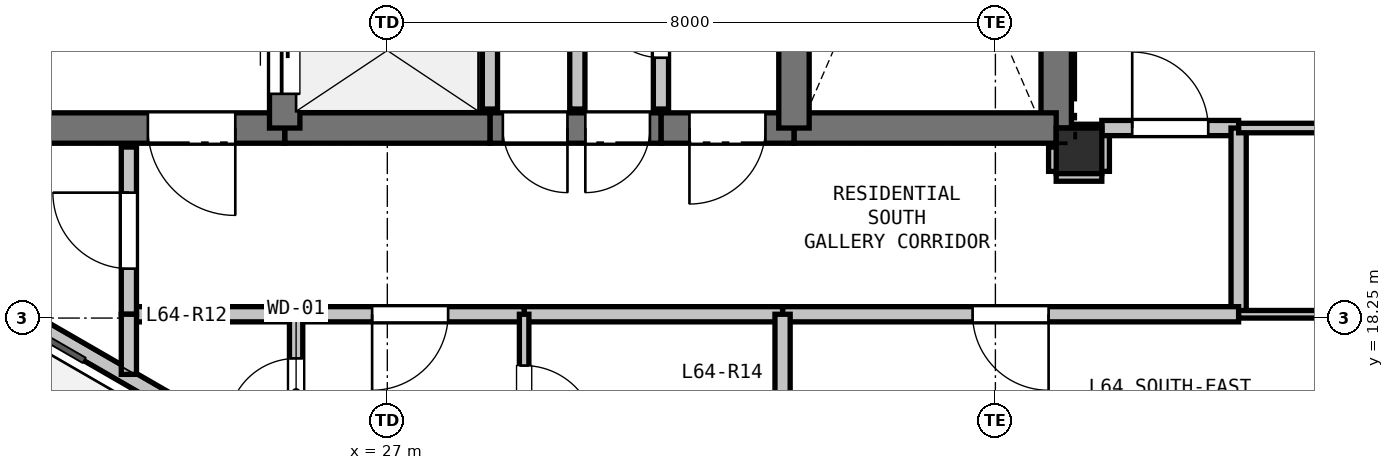
"""IFC4 building model, lengths in metres.
Left out: names, types, materials, properties, quantities, classifications, styles, units other than length and angle.
Written with IfcOpenShell. Run it as: python <this file> out.ifc"""

import sys

from ifc_helpers import new_model, si_unit, direction, frame, frame_2d, origin, origin_2d, place, context, subcontext, project, spatial, rectangle, extrude, element, fill, save


model = new_model("IFC4")
c1 = context("Model", 3, precision=1e-05, world=origin(), true_north=direction((0.0, 1.0)))
c2 = subcontext(c1, "Body", "Model", "MODEL_VIEW")
j1 = project(units=[si_unit("LENGTHUNIT", "METRE"), si_unit("PLANEANGLEUNIT", "RADIAN")], contexts=[c1])
p1 = place(None, origin())
s1 = spatial("IfcSite", under=j1, at=p1, CompositionType="ELEMENT")
p2 = place(p1, origin())
s2 = spatial("IfcBuilding", under=s1, at=p2, CompositionType="ELEMENT")
p3 = place(p2, frame((0.0, 0.0, 229.8)))
s3 = spatial("IfcBuildingStorey", under=s2, at=p3, CompositionType="ELEMENT", Elevation=229.8)
p4 = place(p3, frame((36.1, 20.45, 0.0), z_axis=(0.0, 0.0, 1.0), x_axis=(1.0, 0.0, 0.0)))
e1 = element("IfcColumn", 1, at=p4, inside=s3, PredefinedType="COLUMN", context=c2, shape_type="SweptSolid", body=[
    extrude(rectangle(XDim=0.6, YDim=0.6, at=origin_2d()), origin(), (0.0, 0.0, 1.0), 3.3),
])
p5 = place(p3, frame((27.191, 15.389, 0.0), z_axis=(0.0, 0.0, 1.0), x_axis=(-0.866019557082, 0.500010126649, 0.0)))
e2 = element("IfcWall", 2, at=p5, inside=s3, PredefinedType="PARAPET", context=c2, shape_type="SweptSolid", body=[
    extrude(rectangle(XDim=8.228, YDim=0.2, at=frame_2d((4.114, 0.0))), origin(), (0.0, 0.0, 1.0), 0.2),
])
p6 = place(p3, frame((35.8, 28.1, 0.0), z_axis=(0.0, 0.0, 1.0), x_axis=(0.0, -1.0, 0.0)))
e3 = element("IfcWall", 3, at=p6, inside=s3, PredefinedType="SHEAR", context=c2, shape_type="SweptSolid", body=[
    extrude(rectangle(XDim=7.35, YDim=0.4, at=frame_2d((3.675, 0.0))), origin(), (0.0, 0.0, 1.0), 3.08),
])
p7 = place(p3, frame((35.8, 20.75, 0.0), z_axis=(0.0, 0.0, 1.0), x_axis=(-1.0, 0.0, 0.0)))
e4 = element("IfcWall", 4, at=p7, inside=s3, PredefinedType="SHEAR", context=c2, shape_type="SweptSolid", body=[
    extrude(rectangle(XDim=3.45, YDim=0.4, at=frame_2d((1.725, 0.0))), origin(), (0.0, 0.0, 1.0), 3.08),
])
p8 = place(p3, frame((32.35, 20.75, 0.0), z_axis=(0.0, 0.0, 1.0), x_axis=(-1.0, 0.0, 0.0)))
e5 = element("IfcWall", 5, at=p8, inside=s3, PredefinedType="SHEAR", context=c2, shape_type="SweptSolid", body=[
    extrude(rectangle(XDim=1.75, YDim=0.4, at=frame_2d((0.875, 0.0))), origin(), (0.0, 0.0, 1.0), 3.08),
])
p9 = place(p8, frame((0.375, 0.0, 0.0)))
e6 = element("IfcOpeningElement", 6, at=p9, cuts=e5, PredefinedType="OPENING", context=c2, shape_type="SweptSolid", body=[
    extrude(rectangle(XDim=1.0, YDim=2.15, at=frame_2d((0.5, 1.075))), frame((0.0, 0.21, 0.0), z_axis=(0.0, -1.0, 0.0), x_axis=(1.0, 0.0, 0.0)), (0.0, 0.0, 1.0), 0.42),
])
p10 = place(p3, frame((30.6, 20.75, 0.0), z_axis=(0.0, 0.0, 1.0), x_axis=(-1.0, 0.0, 0.0)))
e7 = element("IfcWall", 7, at=p10, inside=s3, PredefinedType="SHEAR", context=c2, shape_type="SweptSolid", body=[
    extrude(rectangle(XDim=2.25, YDim=0.4, at=frame_2d((1.125, 0.0))), origin(), (0.0, 0.0, 1.0), 3.08),
])
p11 = place(p10, frame((1.23, 0.0, 0.0)))
e8 = element("IfcOpeningElement", 8, at=p11, cuts=e7, PredefinedType="OPENING", context=c2, shape_type="SweptSolid", body=[
    extrude(rectangle(XDim=0.85, YDim=2.1, at=frame_2d((0.425, 1.05))), frame((0.0, 0.21, 0.0), z_axis=(0.0, -1.0, 0.0), x_axis=(1.0, 0.0, 0.0)), (0.0, 0.0, 1.0), 0.42),
])
p12 = place(p10, frame((0.145, 0.0, 0.0)))
e9 = element("IfcOpeningElement", 9, at=p12, cuts=e7, PredefinedType="OPENING", context=c2, shape_type="SweptSolid", body=[
    extrude(rectangle(XDim=0.85, YDim=2.1, at=frame_2d((0.425, 1.05))), frame((0.0, 0.21, 0.0), z_axis=(0.0, -1.0, 0.0), x_axis=(1.0, 0.0, 0.0)), (0.0, 0.0, 1.0), 0.42),
])
p13 = place(p3, frame((28.35, 20.75, 0.0), z_axis=(0.0, 0.0, 1.0), x_axis=(-1.0, 0.0, 0.0)))
e10 = element("IfcWall", 10, at=p13, inside=s3, PredefinedType="SHEAR", context=c2, shape_type="SweptSolid", body=[
    extrude(rectangle(XDim=2.7, YDim=0.4, at=frame_2d((1.35, 0.0))), origin(), (0.0, 0.0, 1.0), 3.08),
])
p14 = place(p3, frame((25.65, 20.75, 0.0), z_axis=(0.0, 0.0, 1.0), x_axis=(-1.0, 0.0, 0.0)))
e11 = element("IfcWall", 11, at=p14, inside=s3, PredefinedType="SHEAR", context=c2, shape_type="SweptSolid", body=[
    extrude(rectangle(XDim=3.45, YDim=0.4, at=frame_2d((1.725, 0.0))), origin(), (0.0, 0.0, 1.0), 3.08),
])
p15 = place(p14, frame((0.65, 0.0, 0.0)))
e12 = element("IfcOpeningElement", 12, at=p15, cuts=e11, PredefinedType="OPENING", context=c2, shape_type="SweptSolid", body=[
    extrude(rectangle(XDim=1.15, YDim=2.15, at=frame_2d((0.575, 1.075))), frame((0.0, 0.21, 0.0), z_axis=(0.0, -1.0, 0.0), x_axis=(1.0, 0.0, 0.0)), (0.0, 0.0, 1.0), 0.42),
])
p16 = place(p3, frame((25.65, 20.75, 0.0), z_axis=(0.0, 0.0, 1.0), x_axis=(0.0, 1.0, 0.0)))
e13 = element("IfcWall", 13, at=p16, inside=s3, PredefinedType="SHEAR", context=c2, shape_type="SweptSolid", body=[
    extrude(rectangle(XDim=2.0, YDim=0.4, at=frame_2d((1.0, 0.0))), origin(), (0.0, 0.0, 1.0), 3.08),
])
p17 = place(p16, frame((0.45, 0.0, 0.0)))
e14 = element("IfcOpeningElement", 14, at=p17, cuts=e13, PredefinedType="OPENING", context=c2, shape_type="SweptSolid", body=[
    extrude(rectangle(XDim=1.1, YDim=2.15, at=frame_2d((0.55, 1.075))), frame((0.0, 0.21, 0.0), z_axis=(0.0, -1.0, 0.0), x_axis=(1.0, 0.0, 0.0)), (0.0, 0.0, 1.0), 0.42),
])
p18 = place(p3, frame((32.35, 20.75, 0.0), z_axis=(0.0, 0.0, 1.0), x_axis=(0.0, 1.0, 0.0)))
e15 = element("IfcWall", 15, at=p18, inside=s3, PredefinedType="SHEAR", context=c2, shape_type="SweptSolid", body=[
    extrude(rectangle(XDim=4.8, YDim=0.4, at=frame_2d((2.4, 0.0))), origin(), (0.0, 0.0, 1.0), 3.08),
])
p19 = place(p3, frame((28.35, 23.2, 0.0), z_axis=(0.0, 0.0, 1.0), x_axis=(0.0, -1.0, 0.0)))
e16 = element("IfcWall", 16, at=p19, inside=s3, PredefinedType="PARTITIONING", context=c2, shape_type="SweptSolid", body=[
    extrude(rectangle(XDim=2.2, YDim=0.2, at=frame_2d((1.1, 0.0))), origin(), (0.0, 0.0, 1.0), 3.08),
])
p20 = place(p3, frame((30.6, 21.0, 0.0), z_axis=(0.0, 0.0, 1.0), x_axis=(0.0, 1.0, 0.0)))
e17 = element("IfcWall", 17, at=p20, inside=s3, PredefinedType="PARTITIONING", context=c2, shape_type="SweptSolid", body=[
    extrude(rectangle(XDim=2.2, YDim=0.2, at=frame_2d((1.1, 0.0))), origin(), (0.0, 0.0, 1.0), 3.08),
])
p21 = place(p20, frame((0.675, 0.0, 0.0)))
e18 = element("IfcOpeningElement", 18, at=p21, cuts=e17, PredefinedType="OPENING", context=c2, shape_type="SweptSolid", body=[
    extrude(rectangle(XDim=0.85, YDim=2.1, at=frame_2d((0.425, 1.05))), frame((0.0, 0.11, 0.0), z_axis=(0.0, -1.0, 0.0), x_axis=(1.0, 0.0, 0.0)), (0.0, 0.0, 1.0), 0.22),
])
p22 = place(p3, frame((35.8, 20.15, 0.0), z_axis=(0.0, 0.0, 1.0), x_axis=(1.0, 0.0, 0.0)))
e19 = element("IfcWall", 19, at=p22, inside=s3, PredefinedType="PARTITIONING", context=c2, shape_type="SweptSolid", body=[
    extrude(rectangle(XDim=0.6, YDim=0.2, at=frame_2d((0.3, 0.0))), origin(), (0.0, 0.0, 1.0), 2.528),
])
p23 = place(p3, frame((36.4, 20.18, 0.0), z_axis=(0.0, 0.0, 1.0), x_axis=(0.0, 1.0, 0.0)))
e20 = element("IfcWall", 20, at=p23, inside=s3, PredefinedType="PARTITIONING", context=c2, shape_type="SweptSolid", body=[
    extrude(rectangle(XDim=0.57, YDim=0.2, at=frame_2d((0.285, 0.0))), origin(), (0.0, 0.0, 1.0), 3.08),
])
p24 = place(p3, frame((36.4, 20.75, 0.0), z_axis=(0.0, 0.0, 1.0), x_axis=(1.0, 0.0, 0.0)))
e21 = element("IfcWall", 21, at=p24, inside=s3, PredefinedType="PARTITIONING", context=c2, shape_type="SweptSolid", body=[
    extrude(rectangle(XDim=1.8, YDim=0.2, at=frame_2d((0.9, 0.0))), origin(), (0.0, 0.0, 1.0), 3.08),
])
p25 = place(p24, frame((0.4, 0.0, 0.0)))
e22 = element("IfcOpeningElement", 22, at=p25, cuts=e21, PredefinedType="OPENING", context=c2, shape_type="SweptSolid", body=[
    extrude(rectangle(XDim=1.0, YDim=2.15, at=frame_2d((0.5, 1.075))), frame((0.0, 0.11, 0.0), z_axis=(0.0, -1.0, 0.0), x_axis=(1.0, 0.0, 0.0)), (0.0, 0.0, 1.0), 0.22),
])
p26 = place(p3, frame((38.2, 20.75, 0.0), z_axis=(0.0, 0.0, 1.0), x_axis=(0.0, -1.0, 0.0)))
e23 = element("IfcWall", 23, at=p26, inside=s3, PredefinedType="PARTITIONING", context=c2, shape_type="SweptSolid", body=[
    extrude(rectangle(XDim=2.45, YDim=0.2, at=frame_2d((1.225, 0.0))), origin(), (0.0, 0.0, 1.0), 3.08),
])
p27 = place(p3, frame((38.2, 18.3, 0.0), z_axis=(0.0, 0.0, 1.0), x_axis=(-1.0, 0.0, 0.0)))
e24 = element("IfcWall", 24, at=p27, inside=s3, PredefinedType="PARTITIONING", context=c2, shape_type="SweptSolid", body=[
    extrude(rectangle(XDim=6.0, YDim=0.2, at=frame_2d((3.0, 0.0))), origin(), (0.0, 0.0, 1.0), 2.528),
])
p28 = place(p27, frame((2.5, 0.0, 0.0)))
e25 = element("IfcOpeningElement", 25, at=p28, cuts=e24, PredefinedType="OPENING", context=c2, shape_type="SweptSolid", body=[
    extrude(rectangle(XDim=1.0, YDim=2.15, at=frame_2d((0.5, 1.075))), frame((0.0, 0.11, 0.0), z_axis=(0.0, -1.0, 0.0), x_axis=(1.0, 0.0, 0.0)), (0.0, 0.0, 1.0), 0.22),
])
p29 = place(p3, frame((32.2, 18.3, 0.0), z_axis=(0.0, 0.0, 1.0), x_axis=(-1.0, 0.0, 0.0)))
e26 = element("IfcWall", 26, at=p29, inside=s3, PredefinedType="PARTITIONING", context=c2, shape_type="SweptSolid", body=[
    extrude(rectangle(XDim=3.4, YDim=0.2, at=frame_2d((1.7, 0.0))), origin(), (0.0, 0.0, 1.0), 3.08),
])
p30 = place(p3, frame((28.8, 18.3, 0.0), z_axis=(0.0, 0.0, 1.0), x_axis=(-1.0, 0.0, 0.0)))
e27 = element("IfcWall", 27, at=p30, inside=s3, PredefinedType="PARTITIONING", context=c2, shape_type="SweptSolid", body=[
    extrude(rectangle(XDim=3.0, YDim=0.2, at=frame_2d((1.5, 0.0))), origin(), (0.0, 0.0, 1.0), 3.08),
])
p31 = place(p30, frame((1.0, 0.0, 0.0)))
e28 = element("IfcOpeningElement", 28, at=p31, cuts=e27, PredefinedType="OPENING", context=c2, shape_type="SweptSolid", body=[
    extrude(rectangle(XDim=1.0, YDim=2.15, at=frame_2d((0.5, 1.075))), frame((0.0, 0.11, 0.0), z_axis=(0.0, -1.0, 0.0), x_axis=(1.0, 0.0, 0.0)), (0.0, 0.0, 1.0), 0.22),
])
p32 = place(p3, frame((25.8, 18.3, 0.0), z_axis=(0.0, 0.0, 1.0), x_axis=(-1.0, 0.0, 0.0)))
e29 = element("IfcWall", 29, at=p32, inside=s3, PredefinedType="PARTITIONING", context=c2, shape_type="SweptSolid", body=[
    extrude(rectangle(XDim=2.2, YDim=0.2, at=frame_2d((1.1, 0.0))), origin(), (0.0, 0.0, 1.0), 2.365),
])
p33 = place(p3, frame((23.6, 18.3, 0.0), z_axis=(0.0, 0.0, 1.0), x_axis=(0.0, 1.0, 0.0)))
e30 = element("IfcWall", 30, at=p33, inside=s3, PredefinedType="PARTITIONING", context=c2, shape_type="SweptSolid", body=[
    extrude(rectangle(XDim=2.2, YDim=0.2, at=frame_2d((1.1, 0.0))), origin(), (0.0, 0.0, 1.0), 2.528),
])
p34 = place(p33, frame((0.6, 0.0, 0.0)))
e31 = element("IfcOpeningElement", 31, at=p34, cuts=e30, PredefinedType="OPENING", context=c2, shape_type="SweptSolid", body=[
    extrude(rectangle(XDim=1.0, YDim=2.15, at=frame_2d((0.5, 1.075))), frame((0.0, 0.11, 0.0), z_axis=(0.0, -1.0, 0.0), x_axis=(1.0, 0.0, 0.0)), (0.0, 0.0, 1.0), 0.22),
])
p35 = place(p3, frame((35.8, 20.5, 0.0), z_axis=(0.0, 0.0, 1.0), x_axis=(0.0, -1.0, 0.0)))
e32 = element("IfcWall", 32, at=p35, inside=s3, PredefinedType="PARTITIONING", context=c2, shape_type="SweptSolid", body=[
    extrude(rectangle(XDim=0.32, YDim=0.2, at=frame_2d((0.16, 0.0))), origin(), (0.0, 0.0, 1.0), 2.605),
])
p36 = place(p3, frame((28.8, 18.3, 0.0), z_axis=(0.0, 0.0, 1.0), x_axis=(0.0, -1.0, 0.0)))
e33 = element("IfcWall", 33, at=p36, inside=s3, PredefinedType="PARTITIONING", context=c2, shape_type="SweptSolid", body=[
    extrude(rectangle(XDim=2.3, YDim=0.125, at=frame_2d((1.15, 0.0))), origin(), (0.0, 0.0, 1.0), 3.08),
])
p37 = place(p36, frame((0.675, 0.0, 0.0)))
e34 = element("IfcOpeningElement", 34, at=p37, cuts=e33, PredefinedType="OPENING", context=c2, shape_type="SweptSolid", body=[
    extrude(rectangle(XDim=0.95, YDim=2.1, at=frame_2d((0.475, 1.05))), frame((0.0, 0.073, 0.0), z_axis=(0.0, -1.0, 0.0), x_axis=(1.0, 0.0, 0.0)), (0.0, 0.0, 1.0), 0.145),
])
p38 = place(p3, frame((25.8, 16.239, 0.0), z_axis=(0.0, 0.0, 1.0), x_axis=(0.0, 1.0, 0.0)))
e35 = element("IfcWall", 35, at=p38, inside=s3, PredefinedType="PLUMBINGWALL", context=c2, shape_type="SweptSolid", body=[
    extrude(rectangle(XDim=2.061, YDim=0.175, at=frame_2d((1.031, 0.0))), origin(), (0.0, 0.0, 1.0), 2.365),
])
p39 = place(p38, frame((0.581, 0.0, 0.0)))
e36 = element("IfcOpeningElement", 36, at=p39, cuts=e35, PredefinedType="OPENING", context=c2, shape_type="SweptSolid", body=[
    extrude(rectangle(XDim=0.9, YDim=2.1, at=frame_2d((0.45, 1.05))), frame((0.0, 0.097, 0.0), z_axis=(0.0, -1.0, 0.0), x_axis=(1.0, 0.0, 0.0)), (0.0, 0.0, 1.0), 0.195),
])
p40 = place(p3, frame((23.6, 17.509, 0.0), z_axis=(0.0, 0.0, 1.0), x_axis=(0.0, 1.0, 0.0)))
e37 = element("IfcWall", 37, at=p40, inside=s3, PredefinedType="PARTITIONING", context=c2, shape_type="SweptSolid", body=[
    extrude(rectangle(XDim=0.791, YDim=0.2, at=frame_2d((0.396, 0.0))), origin(), (0.0, 0.0, 1.0), 2.365),
])
p41 = place(p3, frame((32.2, 18.3, 0.0), z_axis=(0.0, 0.0, 1.0), x_axis=(0.0, -1.0, 0.0)))
e38 = element("IfcWall", 38, at=p41, inside=s3, PredefinedType="PARTITIONING", context=c2, shape_type="SweptSolid", body=[
    extrude(rectangle(XDim=2.3, YDim=0.2, at=frame_2d((1.15, 0.0))), origin(), (0.0, 0.0, 1.0), 3.08),
])
p42 = place(p3, frame((29.5, 23.2, 0.0), z_axis=(0.0, 0.0, 1.0), x_axis=(0.0, -1.0, 0.0)))
e39 = element("IfcWall", 39, at=p42, inside=s3, PredefinedType="PARTITIONING", context=c2, shape_type="SweptSolid", body=[
    extrude(rectangle(XDim=2.2, YDim=0.2, at=frame_2d((1.1, 0.0))), origin(), (0.0, 0.0, 1.0), 3.08),
])
p43 = place(p3, frame((38.2, 18.3, 0.0), z_axis=(0.0, 0.0, 1.0), x_axis=(1.0, 0.0, 0.0)))
e40 = element("IfcWall", 40, at=p43, inside=s3, PredefinedType="PARTITIONING", context=c2, shape_type="SweptSolid", body=[
    extrude(rectangle(XDim=1.406, YDim=0.1, at=frame_2d((0.703, 0.0))), origin(), (0.0, 0.0, 1.0), 2.365),
])
p44 = place(p3, frame((39.606, 20.75, 0.0), z_axis=(0.0, 0.0, 1.0), x_axis=(-1.0, 0.0, 0.0)))
e41 = element("IfcWall", 41, at=p44, inside=s3, PredefinedType="PARTITIONING", context=c2, shape_type="SweptSolid", body=[
    extrude(rectangle(XDim=1.406, YDim=0.125, at=frame_2d((0.703, 0.0))), origin(), (0.0, 0.0, 1.0), 2.365),
])
p45 = place(p3, frame((36.4, 20.75, 0.0), z_axis=(0.0, 0.0, 1.0), x_axis=(-1.0, 0.0, 0.0)))
e42 = element("IfcWall", 42, at=p45, inside=s3, PredefinedType="PARTITIONING", context=c2, shape_type="SweptSolid", body=[
    extrude(rectangle(XDim=0.35, YDim=0.1, at=frame_2d((0.175, 0.0))), origin(), (0.0, 0.0, 1.0), 2.605),
])
p46 = place(p9, origin())
e43 = element("IfcDoor", 43, at=p46, inside=s3, OperationType="SINGLE_SWING_RIGHT", PredefinedType="DOOR", context=c2, shape_type="SweptSolid", body=[
    extrude(rectangle(XDim=1.0, YDim=2.15, at=frame_2d((0.5, 1.075))), frame((0.0, 0.025, 0.0), z_axis=(0.0, -1.0, 0.0), x_axis=(1.0, 0.0, 0.0)), (0.0, 0.0, 1.0), 0.05),
])
fill(e6, e43)
p47 = place(p17, origin())
e44 = element("IfcDoor", 44, at=p47, inside=s3, OperationType="SLIDING_TO_LEFT", PredefinedType="DOOR", context=c2, shape_type="SweptSolid", body=[
    extrude(rectangle(XDim=1.1, YDim=2.15, at=frame_2d((0.55, 1.075))), frame((0.0, 0.025, 0.0), z_axis=(0.0, -1.0, 0.0), x_axis=(1.0, 0.0, 0.0)), (0.0, 0.0, 1.0), 0.05),
])
fill(e14, e44)
p48 = place(p15, origin())
e45 = element("IfcDoor", 45, at=p48, inside=s3, OperationType="SINGLE_SWING_LEFT", PredefinedType="DOOR", context=c2, shape_type="SweptSolid", body=[
    extrude(rectangle(XDim=1.15, YDim=2.15, at=frame_2d((0.575, 1.075))), frame((0.0, 0.025, 0.0), z_axis=(0.0, -1.0, 0.0), x_axis=(1.0, 0.0, 0.0)), (0.0, 0.0, 1.0), 0.05),
])
fill(e12, e45)
p49 = place(p21, origin())
e46 = element("IfcDoor", 46, at=p49, inside=s3, OperationType="SINGLE_SWING_RIGHT", PredefinedType="DOOR", context=c2, shape_type="SweptSolid", body=[
    extrude(rectangle(XDim=0.85, YDim=2.1, at=frame_2d((0.425, 1.05))), frame((0.0, 0.025, 0.0), z_axis=(0.0, -1.0, 0.0), x_axis=(1.0, 0.0, 0.0)), (0.0, 0.0, 1.0), 0.05),
])
fill(e18, e46)
p50 = place(p31, origin())
e47 = element("IfcDoor", 47, at=p50, inside=s3, OperationType="SINGLE_SWING_RIGHT", PredefinedType="DOOR", context=c2, shape_type="SweptSolid", body=[
    extrude(rectangle(XDim=1.0, YDim=2.15, at=frame_2d((0.5, 1.075))), frame((0.0, 0.025, 0.0), z_axis=(0.0, -1.0, 0.0), x_axis=(1.0, 0.0, 0.0)), (0.0, 0.0, 1.0), 0.05),
])
fill(e28, e47)
p51 = place(p11, origin())
e48 = element("IfcDoor", 48, at=p51, inside=s3, OperationType="SINGLE_SWING_LEFT", PredefinedType="DOOR", context=c2, shape_type="SweptSolid", body=[
    extrude(rectangle(XDim=0.85, YDim=2.1, at=frame_2d((0.425, 1.05))), frame((0.0, 0.025, 0.0), z_axis=(0.0, -1.0, 0.0), x_axis=(1.0, 0.0, 0.0)), (0.0, 0.0, 1.0), 0.05),
])
fill(e8, e48)
p52 = place(p12, origin())
e49 = element("IfcDoor", 49, at=p52, inside=s3, OperationType="SINGLE_SWING_RIGHT", PredefinedType="DOOR", context=c2, shape_type="SweptSolid", body=[
    extrude(rectangle(XDim=0.85, YDim=2.1, at=frame_2d((0.425, 1.05))), frame((0.0, 0.025, 0.0), z_axis=(0.0, -1.0, 0.0), x_axis=(1.0, 0.0, 0.0)), (0.0, 0.0, 1.0), 0.05),
])
fill(e9, e49)
p53 = place(p28, origin())
e50 = element("IfcDoor", 50, at=p53, inside=s3, OperationType="SINGLE_SWING_LEFT", PredefinedType="DOOR", context=c2, shape_type="SweptSolid", body=[
    extrude(rectangle(XDim=1.0, YDim=2.15, at=frame_2d((0.5, 1.075))), frame((0.0, 0.025, 0.0), z_axis=(0.0, -1.0, 0.0), x_axis=(1.0, 0.0, 0.0)), (0.0, 0.0, 1.0), 0.05),
])
fill(e25, e50)
p54 = place(p34, origin())
e51 = element("IfcDoor", 51, at=p54, inside=s3, OperationType="SINGLE_SWING_RIGHT", PredefinedType="DOOR", context=c2, shape_type="SweptSolid", body=[
    extrude(rectangle(XDim=1.0, YDim=2.15, at=frame_2d((0.5, 1.075))), frame((0.0, 0.025, 0.0), z_axis=(0.0, -1.0, 0.0), x_axis=(1.0, 0.0, 0.0)), (0.0, 0.0, 1.0), 0.05),
])
fill(e31, e51)
p55 = place(p25, origin())
e52 = element("IfcDoor", 52, at=p55, inside=s3, OperationType="SINGLE_SWING_LEFT", PredefinedType="DOOR", context=c2, shape_type="SweptSolid", body=[
    extrude(rectangle(XDim=1.0, YDim=2.15, at=frame_2d((0.5, 1.075))), frame((0.0, 0.025, 0.0), z_axis=(0.0, -1.0, 0.0), x_axis=(1.0, 0.0, 0.0)), (0.0, 0.0, 1.0), 0.05),
])
fill(e22, e52)
p56 = place(p39, origin())
e53 = element("IfcDoor", 53, at=p56, inside=s3, OperationType="SINGLE_SWING_LEFT", PredefinedType="DOOR", context=c2, shape_type="SweptSolid", body=[
    extrude(rectangle(XDim=0.9, YDim=2.1, at=frame_2d((0.45, 1.05))), frame((0.0, 0.025, 0.0), z_axis=(0.0, -1.0, 0.0), x_axis=(1.0, 0.0, 0.0)), (0.0, 0.0, 1.0), 0.05),
])
fill(e36, e53)
p57 = place(p37, origin())
e54 = element("IfcDoor", 54, at=p57, inside=s3, OperationType="SINGLE_SWING_RIGHT", PredefinedType="DOOR", context=c2, shape_type="SweptSolid", body=[
    extrude(rectangle(XDim=0.95, YDim=2.1, at=frame_2d((0.475, 1.05))), frame((0.0, 0.025, 0.0), z_axis=(0.0, -1.0, 0.0), x_axis=(1.0, 0.0, 0.0)), (0.0, 0.0, 1.0), 0.05),
])
fill(e34, e54)
save(model, sys.argv[1])
